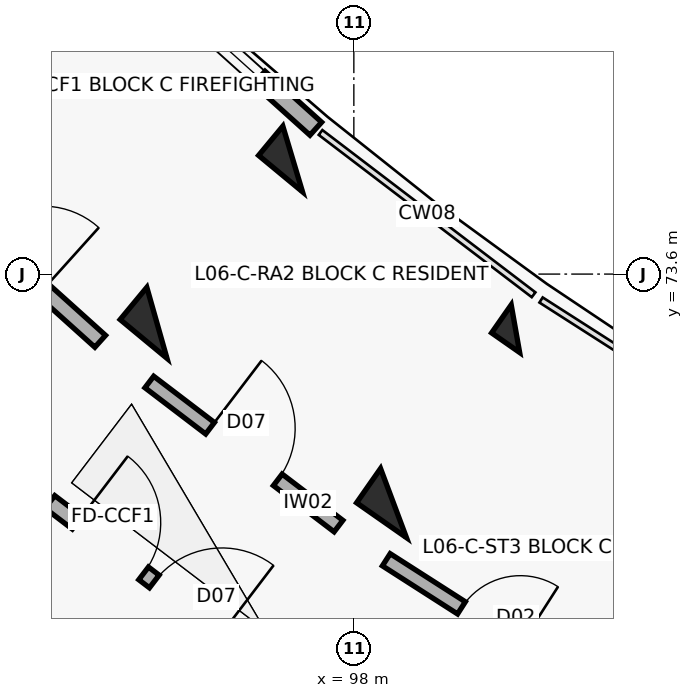
"""IFC4 building model, lengths in metres.
Left out: names, types, materials, properties, quantities, classifications, styles, units other than length and angle.
Written with IfcOpenShell. Run it as: python <this file> out.ifc"""

import sys

from ifc_helpers import new_model, si_unit, direction, frame, frame_2d, origin, origin_2d, place, context, subcontext, project, spatial, rectangle, extrude, element, fill, save


model = new_model("IFC4")
c1 = context("Model", 3, precision=1e-05, world=origin(), true_north=direction((0.0, 1.0)))
c2 = subcontext(c1, "Body", "Model", "MODEL_VIEW")
j1 = project(units=[si_unit("LENGTHUNIT", "METRE"), si_unit("PLANEANGLEUNIT", "RADIAN")], contexts=[c1])
p1 = place(None, origin())
s1 = spatial("IfcSite", under=j1, at=p1, CompositionType="ELEMENT")
p2 = place(p1, origin())
s2 = spatial("IfcBuilding", under=s1, at=p2, CompositionType="ELEMENT")
p3 = place(p2, frame((0.0, 0.0, 20.5)))
s3 = spatial("IfcBuildingStorey", under=s2, at=p3, CompositionType="ELEMENT", Elevation=20.5)
p4 = place(p3, frame((97.195, 75.115, 0.0), z_axis=(0.0, 0.0, 1.0), x_axis=(-0.637961754089, -0.770068049148, 0.0)))
e1 = element("IfcColumn", 1, at=p4, inside=s3, PredefinedType="COLUMN", context=c2, shape_type="SweptSolid", body=[
    extrude(rectangle(XDim=0.5, YDim=0.75, at=origin_2d()), origin(), (0.0, 0.0, 1.0), 3.1),
])
p5 = place(p3, frame((95.409, 72.958, 0.0), z_axis=(0.0, 0.0, 1.0), x_axis=(-0.637961754089, -0.770068049148, 0.0)))
e2 = element("IfcColumn", 2, at=p5, inside=s3, PredefinedType="COLUMN", context=c2, shape_type="SweptSolid", body=[
    extrude(rectangle(XDim=0.55, YDim=0.8, at=origin_2d()), origin(), (0.0, 0.0, 1.0), 3.1),
])
p6 = place(p3, frame((100.126, 72.882, 0.0), z_axis=(0.0, 0.0, 1.0), x_axis=(-0.573004420611, -0.819552276527, 0.0)))
e3 = element("IfcColumn", 3, at=p6, inside=s3, PredefinedType="COLUMN", context=c2, shape_type="SweptSolid", body=[
    extrude(rectangle(XDim=0.45, YDim=0.45, at=origin_2d()), origin(), (0.0, 0.0, 1.0), 3.1),
])
p7 = place(p3, frame((98.522, 70.587, 0.0), z_axis=(0.0, 0.0, 1.0), x_axis=(-0.573004420611, -0.819552276527, 0.0)))
e4 = element("IfcColumn", 4, at=p7, inside=s3, PredefinedType="COLUMN", context=c2, shape_type="SweptSolid", body=[
    extrude(rectangle(XDim=0.55, YDim=0.8, at=origin_2d()), origin(), (0.0, 0.0, 1.0), 3.1),
])
p8 = place(p3, frame((94.82, 77.923, 0.0), z_axis=(0.0, 0.0, 1.0), x_axis=(0.743385092197, -0.668863666751, 0.0)))
e5 = element("IfcWall", 5, at=p8, inside=s3, PredefinedType="SOLIDWALL", context=c2, shape_type="SweptSolid", body=[
    extrude(rectangle(XDim=3.604, YDim=0.23, at=frame_2d((1.802, 0.0))), origin(), (0.0, 0.0, 1.0), 2.25),
])
p9 = place(p8, frame((1.002, 0.0, 0.32)))
e6 = element("IfcOpeningElement", 6, at=p9, cuts=e5, PredefinedType="OPENING", context=c2, shape_type="SweptSolid", body=[
    extrude(rectangle(XDim=1.6, YDim=1.5, at=frame_2d((0.8, 0.75))), frame((0.0, 0.125, 0.0), z_axis=(0.0, -1.0, 0.0), x_axis=(1.0, 0.0, 0.0)), (0.0, 0.0, 1.0), 0.25),
])
p10 = place(p3, frame((92.337, 74.808, 0.0), z_axis=(0.0, 0.0, 1.0), x_axis=(0.743348465558, -0.668904371904, 0.0)))
e7 = element("IfcWall", 7, at=p10, inside=s3, PredefinedType="SOLIDWALL", context=c2, shape_type="SweptSolid", body=[
    extrude(rectangle(XDim=3.129, YDim=0.21, at=frame_2d((1.564, 0.0))), origin(), (0.0, 0.0, 1.0), 2.08),
])
p11 = place(p10, frame((1.014, 0.0, 0.0)))
e8 = element("IfcOpeningElement", 8, at=p11, cuts=e7, PredefinedType="OPENING", context=c2, shape_type="SweptSolid", body=[
    extrude(rectangle(XDim=1.1, YDim=2.15, at=frame_2d((0.55, 1.075))), frame((0.0, 0.115, 0.0), z_axis=(0.0, -1.0, 0.0), x_axis=(1.0, 0.0, 0.0)), (0.0, 0.0, 1.0), 0.23),
])
p12 = place(p3, frame((94.001, 70.602, 0.0), z_axis=(0.0, 0.0, 1.0), x_axis=(0.795498026433, -0.605956178235, 0.0)))
e9 = element("IfcWall", 9, at=p12, inside=s3, PredefinedType="SOLIDWALL", context=c2, shape_type="SweptSolid", body=[
    extrude(rectangle(XDim=3.296, YDim=0.21, at=frame_2d((1.648, 0.0))), origin(), (0.0, 0.0, 1.0), 2.08),
])
p13 = place(p12, frame((0.45, 0.0, 0.0)))
e10 = element("IfcOpeningElement", 10, at=p13, cuts=e9, PredefinedType="OPENING", context=c2, shape_type="SweptSolid", body=[
    extrude(rectangle(XDim=1.1, YDim=2.15, at=frame_2d((0.55, 1.075))), frame((0.0, 0.115, 0.0), z_axis=(0.0, -1.0, 0.0), x_axis=(1.0, 0.0, 0.0)), (0.0, 0.0, 1.0), 0.23),
])
p14 = place(p12, frame((1.726, 0.0, 0.0)))
e11 = element("IfcOpeningElement", 11, at=p14, cuts=e9, PredefinedType="OPENING", context=c2, shape_type="SweptSolid", body=[
    extrude(rectangle(XDim=1.12, YDim=2.15, at=frame_2d((0.56, 1.075))), frame((0.0, 0.115, 0.0), z_axis=(0.0, -1.0, 0.0), x_axis=(1.0, 0.0, 0.0)), (0.0, 0.0, 1.0), 0.23),
])
p15 = place(p3, frame((95.309, 72.18, 0.0), z_axis=(0.0, 0.0, 1.0), x_axis=(0.795463961918, -0.606000895453, 0.0)))
e12 = element("IfcWall", 12, at=p15, inside=s3, PredefinedType="SOLIDWALL", context=c2, shape_type="SweptSolid", body=[
    extrude(rectangle(XDim=3.129, YDim=0.19, at=frame_2d((1.564, 0.0))), origin(), (0.0, 0.0, 1.0), 2.08),
])
p16 = place(p15, frame((1.004, 0.0, 0.0)))
e13 = element("IfcOpeningElement", 13, at=p16, cuts=e12, PredefinedType="OPENING", context=c2, shape_type="SweptSolid", body=[
    extrude(rectangle(XDim=1.12, YDim=2.15, at=frame_2d((0.56, 1.075))), frame((0.0, 0.105, 0.0), z_axis=(0.0, -1.0, 0.0), x_axis=(1.0, 0.0, 0.0)), (0.0, 0.0, 1.0), 0.21),
])
p17 = place(p3, frame((98.427, 69.841, 0.0), z_axis=(0.0, 0.0, 1.0), x_axis=(0.842280895761, -0.539038860043, 0.0)))
e14 = element("IfcWall", 14, at=p17, inside=s3, PredefinedType="SOLIDWALL", context=c2, shape_type="SweptSolid", body=[
    extrude(rectangle(XDim=3.269, YDim=0.19, at=frame_2d((1.634, 0.0))), origin(), (0.0, 0.0, 1.0), 2.08),
])
p18 = place(p17, frame((1.174, 0.0, 0.0)))
e15 = element("IfcOpeningElement", 15, at=p18, cuts=e14, PredefinedType="OPENING", context=c2, shape_type="SweptSolid", body=[
    extrude(rectangle(XDim=0.92, YDim=2.1, at=frame_2d((0.46, 1.05))), frame((0.0, 0.105, 0.0), z_axis=(0.0, -1.0, 0.0), x_axis=(1.0, 0.0, 0.0)), (0.0, 0.0, 1.0), 0.21),
])
p19 = place(p9, origin())
e16 = element("IfcWindow", 16, at=p19, inside=s3, PartitioningType="DOUBLE_PANEL_VERTICAL", PredefinedType="WINDOW", context=c2, shape_type="SweptSolid", body=[
    extrude(rectangle(XDim=1.6, YDim=1.5, at=frame_2d((0.8, 0.75))), frame((0.0, 0.03, 0.0), z_axis=(0.0, -1.0, 0.0), x_axis=(1.0, 0.0, 0.0)), (0.0, 0.0, 1.0), 0.06),
])
fill(e6, e16)
p20 = place(p13, origin())
e17 = element("IfcDoor", 17, at=p20, inside=s3, OperationType="SINGLE_SWING_LEFT", PredefinedType="DOOR", context=c2, shape_type="SweptSolid", body=[
    extrude(rectangle(XDim=1.1, YDim=2.15, at=frame_2d((0.55, 1.075))), frame((0.0, 0.025, 0.0), z_axis=(0.0, -1.0, 0.0), x_axis=(1.0, 0.0, 0.0)), (0.0, 0.0, 1.0), 0.05),
])
fill(e10, e17)
p21 = place(p14, origin())
e18 = element("IfcDoor", 18, at=p21, inside=s3, OperationType="SINGLE_SWING_RIGHT", PredefinedType="DOOR", context=c2, shape_type="SweptSolid", body=[
    extrude(rectangle(XDim=1.12, YDim=2.15, at=frame_2d((0.56, 1.075))), frame((0.0, 0.025, 0.0), z_axis=(0.0, -1.0, 0.0), x_axis=(1.0, 0.0, 0.0)), (0.0, 0.0, 1.0), 0.05),
])
fill(e11, e18)
p22 = place(p16, origin())
e19 = element("IfcDoor", 19, at=p22, inside=s3, OperationType="SINGLE_SWING_LEFT", PredefinedType="DOOR", context=c2, shape_type="SweptSolid", body=[
    extrude(rectangle(XDim=1.12, YDim=2.15, at=frame_2d((0.56, 1.075))), frame((0.0, 0.025, 0.0), z_axis=(0.0, -1.0, 0.0), x_axis=(1.0, 0.0, 0.0)), (0.0, 0.0, 1.0), 0.05),
])
fill(e13, e19)
p23 = place(p18, origin())
e20 = element("IfcDoor", 20, at=p23, inside=s3, OperationType="SINGLE_SWING_RIGHT", PredefinedType="DOOR", context=c2, shape_type="SweptSolid", body=[
    extrude(rectangle(XDim=0.92, YDim=2.1, at=frame_2d((0.46, 1.05))), frame((0.0, 0.025, 0.0), z_axis=(0.0, -1.0, 0.0), x_axis=(1.0, 0.0, 0.0)), (0.0, 0.0, 1.0), 0.05),
])
fill(e15, e20)
save(model, sys.argv[1])
